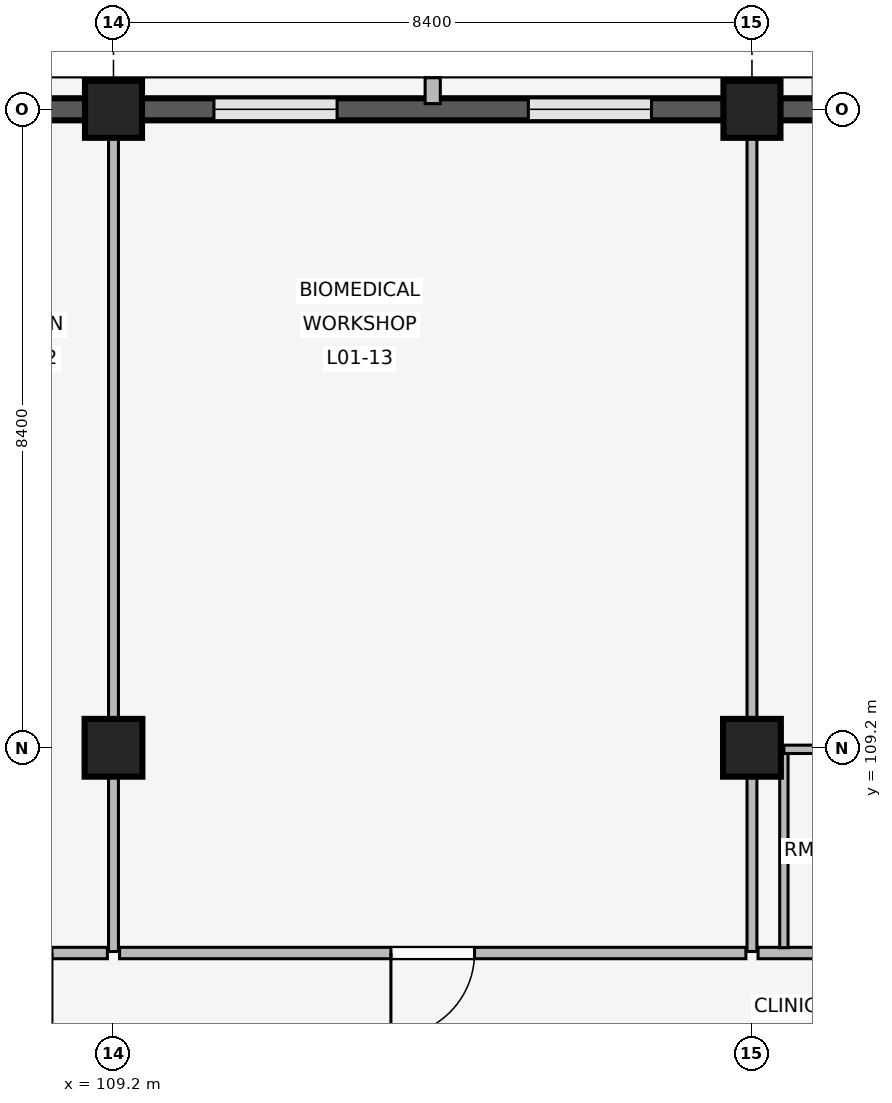
"""IFC4 building model, lengths in metres.
Left out: names, types, materials, properties, quantities, classifications, styles, units other than length and angle.
Written with IfcOpenShell. Run it as: python <this file> out.ifc"""

import sys

from ifc_helpers import new_model, si_unit, direction, frame, frame_2d, origin, origin_2d, place, context, subcontext, project, spatial, rectangle, extrude, element, fill, save


model = new_model("IFC4")
c1 = context("Model", 3, precision=1e-05, world=origin(), true_north=direction((0.0, 1.0)))
c2 = subcontext(c1, "Body", "Model", "MODEL_VIEW")
j1 = project(units=[si_unit("LENGTHUNIT", "METRE"), si_unit("PLANEANGLEUNIT", "RADIAN")], contexts=[c1])
p1 = place(None, origin())
s1 = spatial("IfcSite", under=j1, at=p1, CompositionType="ELEMENT")
p2 = place(p1, origin())
s2 = spatial("IfcBuilding", under=s1, at=p2, CompositionType="ELEMENT")
p3 = place(p2, frame((0.0, 0.0, 4.8)))
s3 = spatial("IfcBuildingStorey", under=s2, at=p3, CompositionType="ELEMENT", Elevation=4.8)
p4 = place(p3, frame((109.2, 109.2, 0.0), z_axis=(0.0, 0.0, 1.0), x_axis=(1.0, 0.0, 0.0)))
e1 = element("IfcColumn", 1, at=p4, inside=s3, PredefinedType="COLUMN", context=c2, shape_type="SweptSolid", body=[
    extrude(rectangle(XDim=0.76, YDim=0.76, at=origin_2d()), origin(), (0.0, 0.0, 1.0), 3.3),
])
p5 = place(p3, frame((109.2, 117.6, 0.0), z_axis=(0.0, 0.0, 1.0), x_axis=(1.0, 0.0, 0.0)))
e2 = element("IfcColumn", 2, at=p5, inside=s3, PredefinedType="COLUMN", context=c2, shape_type="SweptSolid", body=[
    extrude(rectangle(XDim=0.75, YDim=0.75, at=origin_2d()), origin(), (0.0, 0.0, 1.0), 3.3),
])
p6 = place(p3, frame((117.6, 109.2, 0.0), z_axis=(0.0, 0.0, 1.0), x_axis=(1.0, 0.0, 0.0)))
e3 = element("IfcColumn", 3, at=p6, inside=s3, PredefinedType="COLUMN", context=c2, shape_type="SweptSolid", body=[
    extrude(rectangle(XDim=0.76, YDim=0.76, at=origin_2d()), origin(), (0.0, 0.0, 1.0), 3.3),
])
p7 = place(p3, frame((117.6, 117.6, 0.0), z_axis=(0.0, 0.0, 1.0), x_axis=(1.0, 0.0, 0.0)))
e4 = element("IfcColumn", 4, at=p7, inside=s3, PredefinedType="COLUMN", context=c2, shape_type="SweptSolid", body=[
    extrude(rectangle(XDim=0.75, YDim=0.75, at=origin_2d()), origin(), (0.0, 0.0, 1.0), 3.3),
])
p8 = place(p3, frame((101.17, 117.6, 0.0), z_axis=(0.0, 0.0, 1.0), x_axis=(1.0, 0.0, 0.0)))
e5 = element("IfcWall", 5, at=p8, inside=s3, PredefinedType="SOLIDWALL", context=c2, shape_type="SweptSolid", body=[
    extrude(rectangle(XDim=7.66, YDim=0.29, at=frame_2d((3.83, 0.0))), origin(), (0.0, 0.0, 1.0), 2.42),
])
p9 = place(p8, frame((1.032, 0.0, 0.85)))
e6 = element("IfcOpeningElement", 6, at=p9, cuts=e5, PredefinedType="OPENING", context=c2, shape_type="SweptSolid", body=[
    extrude(rectangle(XDim=1.46, YDim=0.85, at=frame_2d((0.73, 0.425))), frame((0.0, 0.155, 0.0), z_axis=(0.0, -1.0, 0.0), x_axis=(1.0, 0.0, 0.0)), (0.0, 0.0, 1.0), 0.31),
])
p10 = place(p8, frame((5.168, 0.0, 0.85)))
e7 = element("IfcOpeningElement", 7, at=p10, cuts=e5, PredefinedType="OPENING", context=c2, shape_type="SweptSolid", body=[
    extrude(rectangle(XDim=1.46, YDim=0.85, at=frame_2d((0.73, 0.425))), frame((0.0, 0.155, 0.0), z_axis=(0.0, -1.0, 0.0), x_axis=(1.0, 0.0, 0.0)), (0.0, 0.0, 1.0), 0.31),
])
p11 = place(p3, frame((109.57, 117.6, 0.0), z_axis=(0.0, 0.0, 1.0), x_axis=(1.0, 0.0, 0.0)))
e8 = element("IfcWall", 8, at=p11, inside=s3, PredefinedType="SOLIDWALL", context=c2, shape_type="SweptSolid", body=[
    extrude(rectangle(XDim=7.66, YDim=0.29, at=frame_2d((3.83, 0.0))), origin(), (0.0, 0.0, 1.0), 2.42),
])
p12 = place(p11, frame((0.952, 0.0, 0.85)))
e9 = element("IfcOpeningElement", 9, at=p12, cuts=e8, PredefinedType="OPENING", context=c2, shape_type="SweptSolid", body=[
    extrude(rectangle(XDim=1.62, YDim=0.95, at=frame_2d((0.81, 0.475))), frame((0.0, 0.155, 0.0), z_axis=(0.0, -1.0, 0.0), x_axis=(1.0, 0.0, 0.0)), (0.0, 0.0, 1.0), 0.31),
])
p13 = place(p11, frame((5.088, 0.0, 0.85)))
e10 = element("IfcOpeningElement", 10, at=p13, cuts=e8, PredefinedType="OPENING", context=c2, shape_type="SweptSolid", body=[
    extrude(rectangle(XDim=1.62, YDim=0.95, at=frame_2d((0.81, 0.475))), frame((0.0, 0.155, 0.0), z_axis=(0.0, -1.0, 0.0), x_axis=(1.0, 0.0, 0.0)), (0.0, 0.0, 1.0), 0.31),
])
p14 = place(p3, frame((113.4, 117.675, 0.0), z_axis=(0.0, 0.0, 1.0), x_axis=(0.0, 1.0, 0.0)))
e11 = element("IfcWall", 11, at=p14, inside=s3, PredefinedType="ELEMENTEDWALL", context=c2, shape_type="SweptSolid", body=[
    extrude(rectangle(XDim=0.34, YDim=0.2, at=frame_2d((0.17, 0.0))), origin(), (0.0, 0.0, 1.0), 2.4),
])
p15 = place(p3, frame((117.97, 117.6, 0.0), z_axis=(0.0, 0.0, 1.0), x_axis=(1.0, 0.0, 0.0)))
e12 = element("IfcWall", 12, at=p15, inside=s3, PredefinedType="SOLIDWALL", context=c2, shape_type="SweptSolid", body=[
    extrude(rectangle(XDim=7.66, YDim=0.29, at=frame_2d((3.83, 0.0))), origin(), (0.0, 0.0, 1.0), 2.42),
])
p16 = place(p15, frame((1.032, 0.0, 0.85)))
e13 = element("IfcOpeningElement", 13, at=p16, cuts=e12, PredefinedType="OPENING", context=c2, shape_type="SweptSolid", body=[
    extrude(rectangle(XDim=1.46, YDim=0.85, at=frame_2d((0.73, 0.425))), frame((0.0, 0.155, 0.0), z_axis=(0.0, -1.0, 0.0), x_axis=(1.0, 0.0, 0.0)), (0.0, 0.0, 1.0), 0.31),
])
p17 = place(p15, frame((5.168, 0.0, 0.85)))
e14 = element("IfcOpeningElement", 14, at=p17, cuts=e12, PredefinedType="OPENING", context=c2, shape_type="SweptSolid", body=[
    extrude(rectangle(XDim=1.46, YDim=0.85, at=frame_2d((0.73, 0.425))), frame((0.0, 0.155, 0.0), z_axis=(0.0, -1.0, 0.0), x_axis=(1.0, 0.0, 0.0)), (0.0, 0.0, 1.0), 0.31),
])
p18 = place(p3, frame((109.12, 106.5, 0.0), z_axis=(0.0, 0.0, 1.0), x_axis=(-1.0, 0.0, 0.0)))
e15 = element("IfcWall", 15, at=p18, inside=s3, PredefinedType="PARTITIONING", context=c2, shape_type="SweptSolid", body=[
    extrude(rectangle(XDim=8.24, YDim=0.15, at=frame_2d((4.12, 0.0))), origin(), (0.0, 0.0, 1.0), 2.4),
])
p19 = place(p18, frame((0.73, 0.0, 0.0)))
e16 = element("IfcOpeningElement", 16, at=p19, cuts=e15, PredefinedType="OPENING", context=c2, shape_type="SweptSolid", body=[
    extrude(rectangle(XDim=1.0, YDim=2.15, at=frame_2d((0.5, 1.075))), frame((0.0, 0.085, 0.0), z_axis=(0.0, -1.0, 0.0), x_axis=(1.0, 0.0, 0.0)), (0.0, 0.0, 1.0), 0.17),
])
p20 = place(p18, frame((4.43, 0.0, 0.0)))
e17 = element("IfcOpeningElement", 17, at=p20, cuts=e15, PredefinedType="OPENING", context=c2, shape_type="SweptSolid", body=[
    extrude(rectangle(XDim=1.0, YDim=2.15, at=frame_2d((0.5, 1.075))), frame((0.0, 0.085, 0.0), z_axis=(0.0, -1.0, 0.0), x_axis=(1.0, 0.0, 0.0)), (0.0, 0.0, 1.0), 0.17),
])
p21 = place(p3, frame((109.2, 106.52, 0.0), z_axis=(0.0, 0.0, 1.0), x_axis=(0.0, 1.0, 0.0)))
e18 = element("IfcWall", 18, at=p21, inside=s3, PredefinedType="PARTITIONING", context=c2, shape_type="SweptSolid", body=[
    extrude(rectangle(XDim=10.94, YDim=0.13, at=frame_2d((5.47, 0.0))), origin(), (0.0, 0.0, 1.0), 2.4),
])
p22 = place(p3, frame((117.52, 106.5, 0.0), z_axis=(0.0, 0.0, 1.0), x_axis=(-1.0, 0.0, 0.0)))
e19 = element("IfcWall", 19, at=p22, inside=s3, PredefinedType="PARTITIONING", context=c2, shape_type="SweptSolid", body=[
    extrude(rectangle(XDim=8.24, YDim=0.15, at=frame_2d((4.12, 0.0))), origin(), (0.0, 0.0, 1.0), 2.4),
])
p23 = place(p22, frame((3.57, 0.0, 0.0)))
e20 = element("IfcOpeningElement", 20, at=p23, cuts=e19, PredefinedType="OPENING", context=c2, shape_type="SweptSolid", body=[
    extrude(rectangle(XDim=1.1, YDim=2.2, at=frame_2d((0.55, 1.1))), frame((0.0, 0.085, 0.0), z_axis=(0.0, -1.0, 0.0), x_axis=(1.0, 0.0, 0.0)), (0.0, 0.0, 1.0), 0.17),
])
p24 = place(p3, frame((117.6, 106.52, 0.0), z_axis=(0.0, 0.0, 1.0), x_axis=(0.0, 1.0, 0.0)))
e21 = element("IfcWall", 21, at=p24, inside=s3, PredefinedType="PARTITIONING", context=c2, shape_type="SweptSolid", body=[
    extrude(rectangle(XDim=10.94, YDim=0.13, at=frame_2d((5.47, 0.0))), origin(), (0.0, 0.0, 1.0), 2.4),
])
p25 = place(p3, frame((125.92, 106.5, 0.0), z_axis=(0.0, 0.0, 1.0), x_axis=(-1.0, 0.0, 0.0)))
e22 = element("IfcWall", 22, at=p25, inside=s3, PredefinedType="PARTITIONING", context=c2, shape_type="SweptSolid", body=[
    extrude(rectangle(XDim=8.24, YDim=0.15, at=frame_2d((4.12, 0.0))), origin(), (0.0, 0.0, 1.0), 2.4),
])
p26 = place(p25, frame((0.73, 0.0, 0.0)))
e23 = element("IfcOpeningElement", 23, at=p26, cuts=e22, PredefinedType="OPENING", context=c2, shape_type="SweptSolid", body=[
    extrude(rectangle(XDim=1.0, YDim=2.15, at=frame_2d((0.5, 1.075))), frame((0.0, 0.085, 0.0), z_axis=(0.0, -1.0, 0.0), x_axis=(1.0, 0.0, 0.0)), (0.0, 0.0, 1.0), 0.17),
])
p27 = place(p25, frame((4.43, 0.0, 0.0)))
e24 = element("IfcOpeningElement", 24, at=p27, cuts=e22, PredefinedType="OPENING", context=c2, shape_type="SweptSolid", body=[
    extrude(rectangle(XDim=1.0, YDim=2.15, at=frame_2d((0.5, 1.075))), frame((0.0, 0.085, 0.0), z_axis=(0.0, -1.0, 0.0), x_axis=(1.0, 0.0, 0.0)), (0.0, 0.0, 1.0), 0.17),
])
p28 = place(p3, frame((118.02, 106.57, 0.0), z_axis=(0.0, 0.0, 1.0), x_axis=(0.0, 1.0, 0.0)))
e25 = element("IfcWall", 25, at=p28, inside=s3, PredefinedType="PARTITIONING", context=c2, shape_type="SweptSolid", body=[
    extrude(rectangle(XDim=2.61, YDim=0.11, at=frame_2d((1.305, 0.0))), origin(), (0.0, 0.0, 1.0), 2.4),
])
p29 = place(p3, frame((118.02, 109.18, 0.0), z_axis=(0.0, 0.0, 1.0), x_axis=(1.0, 0.0, 0.0)))
e26 = element("IfcWall", 26, at=p29, inside=s3, PredefinedType="PARTITIONING", context=c2, shape_type="SweptSolid", body=[
    extrude(rectangle(XDim=1.98, YDim=0.11, at=frame_2d((0.99, 0.0))), origin(), (0.0, 0.0, 1.0), 2.4),
])
p30 = place(p29, frame((0.54, 0.0, 0.0)))
e27 = element("IfcOpeningElement", 27, at=p30, cuts=e26, PredefinedType="OPENING", context=c2, shape_type="SweptSolid", body=[
    extrude(rectangle(XDim=0.9, YDim=2.1, at=frame_2d((0.45, 1.05))), frame((0.0, 0.065, 0.0), z_axis=(0.0, -1.0, 0.0), x_axis=(1.0, 0.0, 0.0)), (0.0, 0.0, 1.0), 0.13),
])
p31 = place(p12, origin())
e28 = element("IfcWindow", 28, at=p31, inside=s3, PartitioningType="SINGLE_PANEL", PredefinedType="WINDOW", context=c2, shape_type="SweptSolid", body=[
    extrude(rectangle(XDim=1.62, YDim=0.95, at=frame_2d((0.81, 0.475))), frame((0.0, 0.03, 0.0), z_axis=(0.0, -1.0, 0.0), x_axis=(1.0, 0.0, 0.0)), (0.0, 0.0, 1.0), 0.06),
])
fill(e9, e28)
p32 = place(p13, origin())
e29 = element("IfcWindow", 29, at=p32, inside=s3, PartitioningType="SINGLE_PANEL", PredefinedType="WINDOW", context=c2, shape_type="SweptSolid", body=[
    extrude(rectangle(XDim=1.62, YDim=0.95, at=frame_2d((0.81, 0.475))), frame((0.0, 0.03, 0.0), z_axis=(0.0, -1.0, 0.0), x_axis=(1.0, 0.0, 0.0)), (0.0, 0.0, 1.0), 0.06),
])
fill(e10, e29)
p33 = place(p23, origin())
e30 = element("IfcDoor", 30, at=p33, inside=s3, OperationType="SINGLE_SWING_RIGHT", PredefinedType="DOOR", context=c2, shape_type="SweptSolid", body=[
    extrude(rectangle(XDim=1.1, YDim=2.2, at=frame_2d((0.55, 1.1))), frame((0.0, 0.025, 0.0), z_axis=(0.0, -1.0, 0.0), x_axis=(1.0, 0.0, 0.0)), (0.0, 0.0, 1.0), 0.05),
])
fill(e20, e30)
save(model, sys.argv[1])
